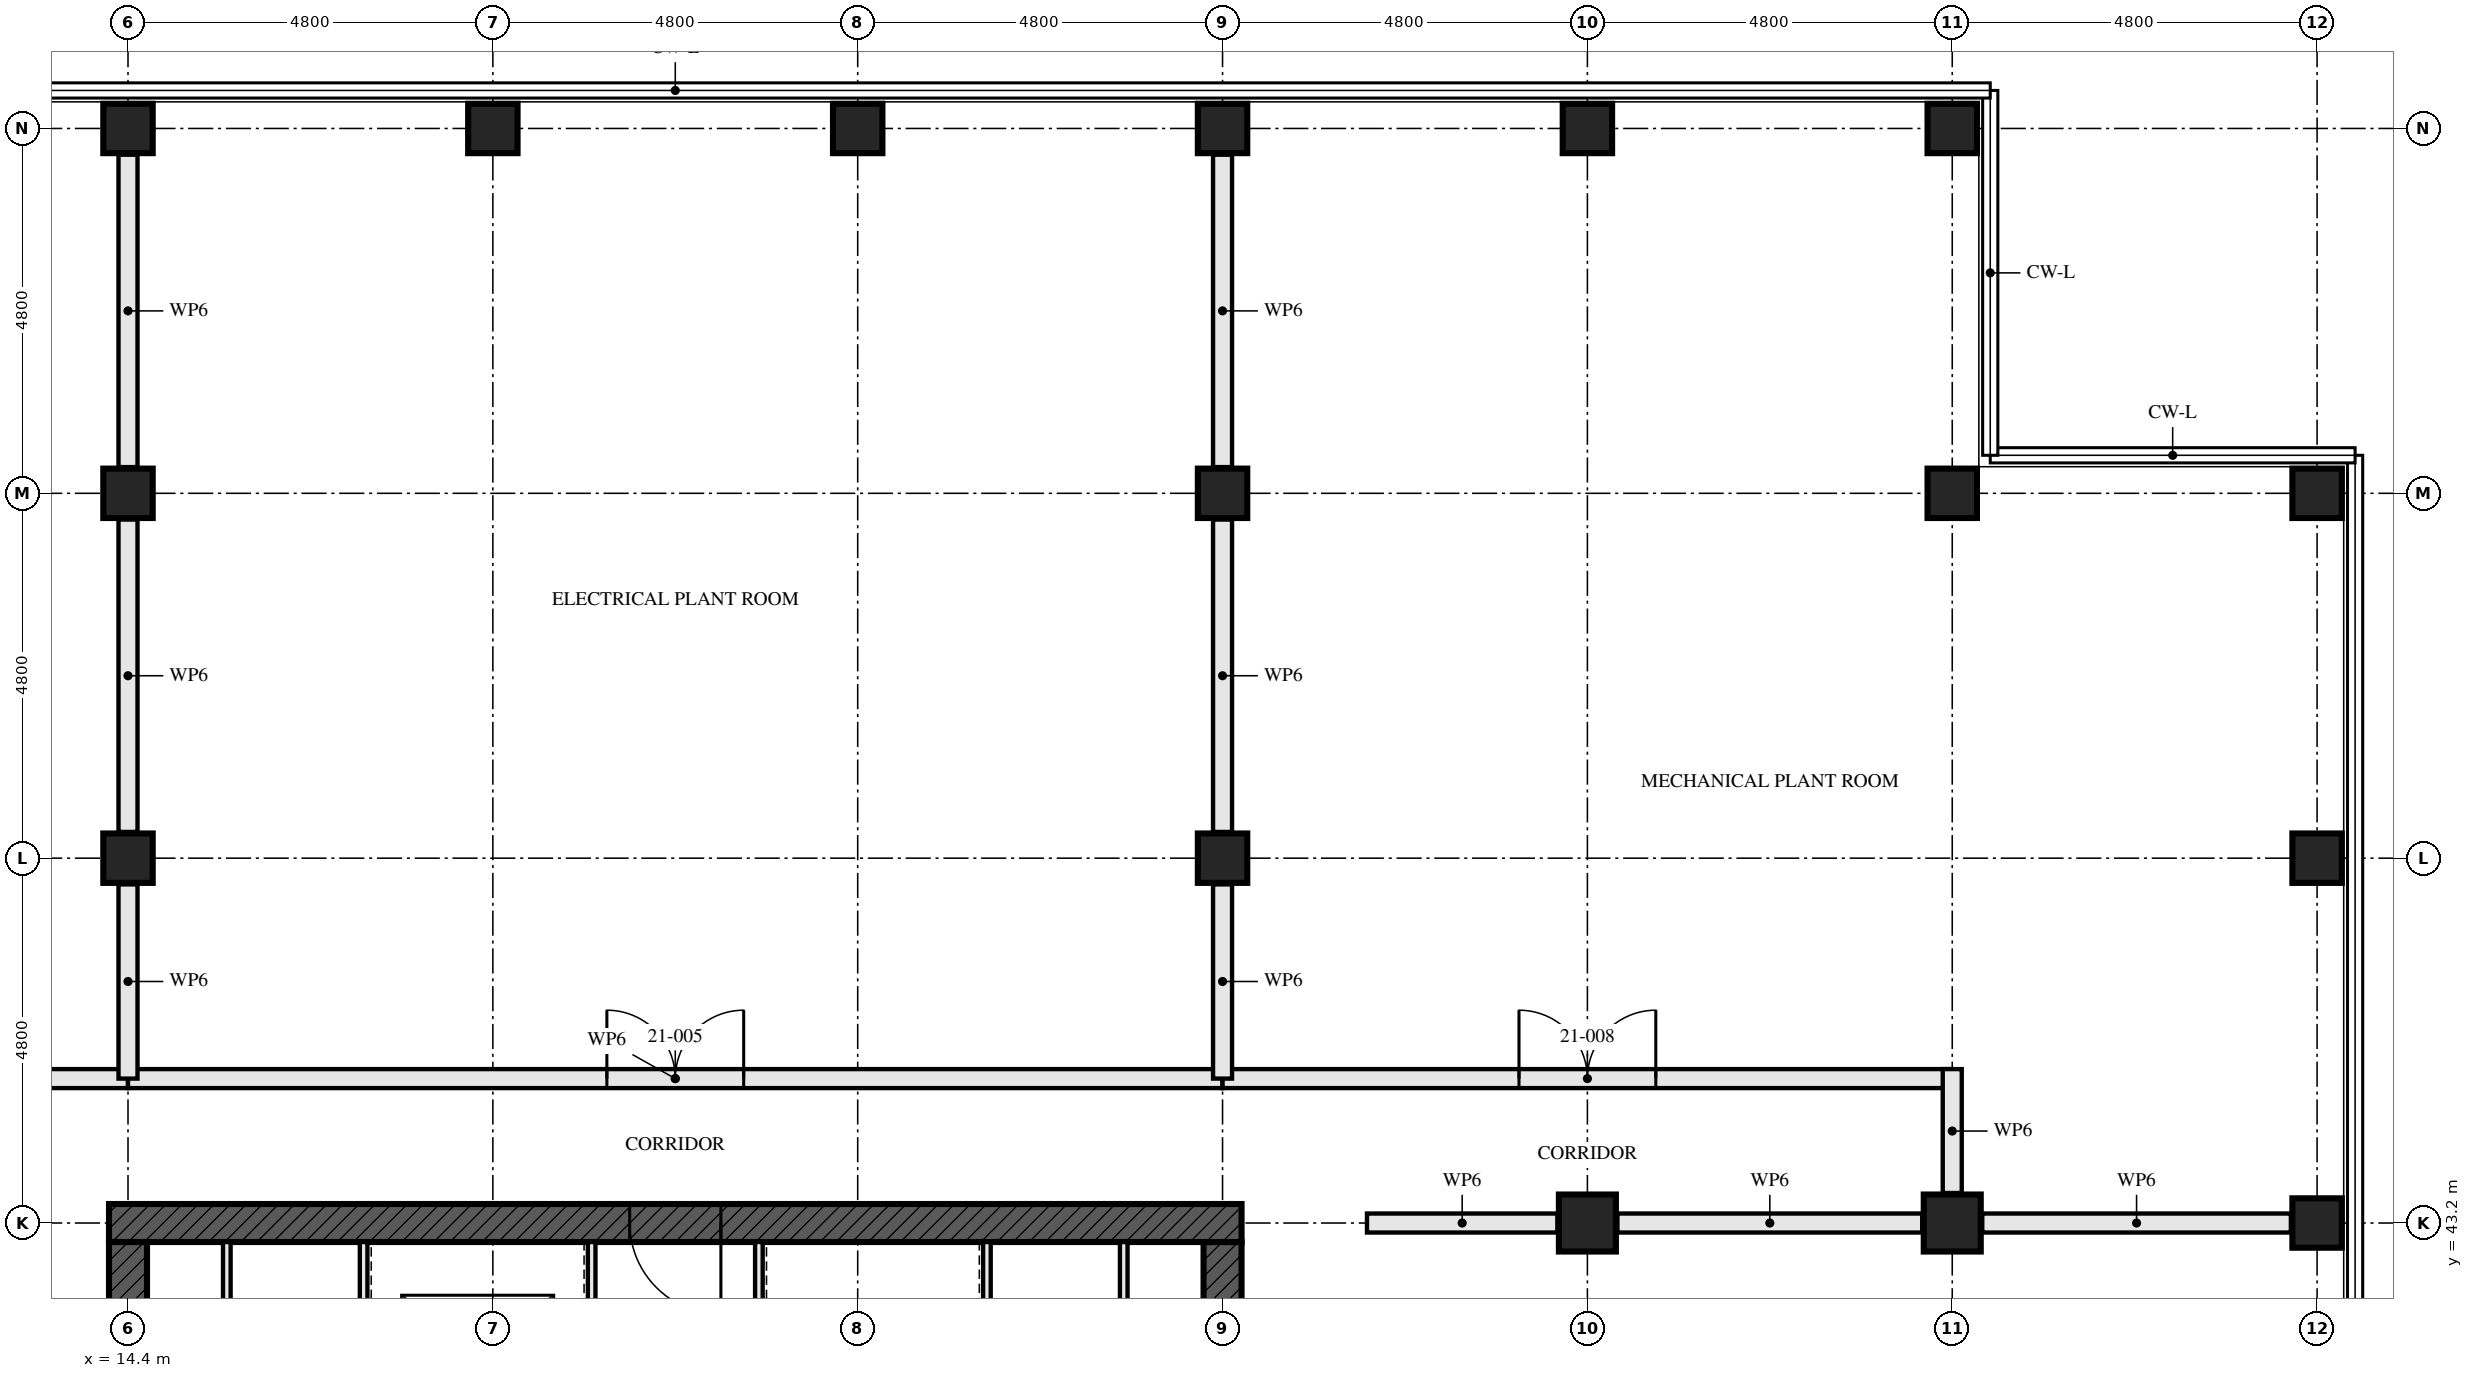
"""IFC4 building model, lengths in metres.
Left out: names, types, materials, properties, quantities, classifications, styles, units other than length and angle.
Written with IfcOpenShell. Run it as: python <this file> out.ifc"""

import sys

from ifc_helpers import new_model, si_unit, direction, frame, frame_2d, origin, origin_2d, place, context, subcontext, project, spatial, rectangle, hollow_rectangle, extrude, element, fill, save


model = new_model("IFC4")
c1 = context("Model", 3, precision=1e-05, world=origin(), true_north=direction((0.0, 1.0)))
c2 = subcontext(c1, "Body", "Model", "MODEL_VIEW")
j1 = project(units=[si_unit("LENGTHUNIT", "METRE"), si_unit("PLANEANGLEUNIT", "RADIAN")], contexts=[c1])
p1 = place(None, origin())
s1 = spatial("IfcSite", under=j1, at=p1, CompositionType="ELEMENT")
p2 = place(p1, origin())
s2 = spatial("IfcBuilding", under=s1, at=p2, CompositionType="ELEMENT")
p3 = place(p2, frame((0.0, 0.0, 79.5)))
s3 = spatial("IfcBuildingStorey", under=s2, at=p3, CompositionType="ELEMENT", Elevation=79.5)
for number, where, z_axis, x_axis in (
    (1, (14.4, 48.0, 0.0), (0.0, 0.0, 1.0), (1.0, 0.0, 0.0)),
    (2, (14.4, 52.8, 0.0), (0.0, 0.0, 1.0), (1.0, 0.0, 0.0)),
):
    element("IfcColumn", number, at=place(p3, frame(where, z_axis=z_axis, x_axis=x_axis)), inside=s3, PredefinedType="COLUMN", context=c2, shape_type="SweptSolid", body=[
        extrude(hollow_rectangle(XDim=0.65, YDim=0.65, WallThickness=0.05, at=origin_2d()), origin(), (0.0, 0.0, 1.0), 4.5),
    ])
for number, where, z_axis, x_axis in (
    (3, (14.4, 57.6, 0.0), (0.0, 0.0, 1.0), (0.0, 1.0, 0.0)),
    (4, (19.2, 57.6, 0.0), (0.0, 0.0, 1.0), (0.0, 1.0, 0.0)),
    (5, (24.0, 57.6, 0.0), (0.0, 0.0, 1.0), (0.0, 1.0, 0.0)),
):
    element("IfcColumn", number, at=place(p3, frame(where, z_axis=z_axis, x_axis=x_axis)), inside=s3, PredefinedType="COLUMN", context=c2, shape_type="SweptSolid", body=[
        extrude(hollow_rectangle(XDim=0.65, YDim=0.65, WallThickness=0.08, at=origin_2d()), origin(), (0.0, 0.0, 1.0), 4.5),
    ])
for number, where, z_axis, x_axis in (
    (6, (28.8, 48.0, 0.0), (0.0, 0.0, 1.0), (1.0, 0.0, 0.0)),
    (7, (28.8, 52.8, 0.0), (0.0, 0.0, 1.0), (1.0, 0.0, 0.0)),
):
    element("IfcColumn", number, at=place(p3, frame(where, z_axis=z_axis, x_axis=x_axis)), inside=s3, PredefinedType="COLUMN", context=c2, shape_type="SweptSolid", body=[
        extrude(hollow_rectangle(XDim=0.65, YDim=0.65, WallThickness=0.05, at=origin_2d()), origin(), (0.0, 0.0, 1.0), 4.5),
    ])
p4 = place(p3, frame((28.8, 57.6, 0.0), z_axis=(0.0, 0.0, 1.0), x_axis=(0.0, 1.0, 0.0)))
e8 = element("IfcColumn", 8, at=p4, inside=s3, PredefinedType="COLUMN", context=c2, shape_type="SweptSolid", body=[
    extrude(hollow_rectangle(XDim=0.65, YDim=0.65, WallThickness=0.08, at=origin_2d()), origin(), (0.0, 0.0, 1.0), 4.33),
])
p5 = place(p3, frame((33.6, 43.2, 0.0), z_axis=(0.0, 0.0, 1.0), x_axis=(0.0, 1.0, 0.0)))
e9 = element("IfcColumn", 9, at=p5, inside=s3, PredefinedType="COLUMN", context=c2, shape_type="SweptSolid", body=[
    extrude(hollow_rectangle(XDim=0.75, YDim=0.75, WallThickness=0.08, at=origin_2d()), origin(), (0.0, 0.0, 1.0), 4.5),
])
p6 = place(p3, frame((33.6, 57.6, 0.0), z_axis=(0.0, 0.0, 1.0), x_axis=(0.0, 1.0, 0.0)))
e10 = element("IfcColumn", 10, at=p6, inside=s3, PredefinedType="COLUMN", context=c2, shape_type="SweptSolid", body=[
    extrude(hollow_rectangle(XDim=0.65, YDim=0.65, WallThickness=0.08, at=origin_2d()), origin(), (0.0, 0.0, 1.0), 4.33),
])
p7 = place(p3, frame((38.4, 43.2, 0.0), z_axis=(0.0, 0.0, 1.0), x_axis=(0.0, 1.0, 0.0)))
e11 = element("IfcColumn", 11, at=p7, inside=s3, PredefinedType="COLUMN", context=c2, shape_type="SweptSolid", body=[
    extrude(hollow_rectangle(XDim=0.75, YDim=0.75, WallThickness=0.08, at=origin_2d()), origin(), (0.0, 0.0, 1.0), 4.5),
])
for number, where, z_axis, x_axis in (
    (12, (38.4, 52.8, 0.0), (0.0, 0.0, 1.0), (0.0, 1.0, 0.0)),
    (13, (38.4, 57.6, 0.0), (0.0, 0.0, 1.0), (0.0, 1.0, 0.0)),
    (14, (43.2, 43.2, 0.0), (0.0, 0.0, 1.0), (0.0, 1.0, 0.0)),
    (15, (43.2, 48.0, 0.0), (0.0, 0.0, 1.0), (1.0, 0.0, 0.0)),
    (16, (43.2, 52.8, 0.0), (0.0, 0.0, 1.0), (0.0, 1.0, 0.0)),
):
    element("IfcColumn", number, at=place(p3, frame(where, z_axis=z_axis, x_axis=x_axis)), inside=s3, PredefinedType="COLUMN", context=c2, shape_type="SweptSolid", body=[
        extrude(hollow_rectangle(XDim=0.65, YDim=0.65, WallThickness=0.08, at=origin_2d()), origin(), (0.0, 0.0, 1.0), 4.33),
    ])
p8 = place(p3, frame((29.05, 43.2, -0.25), z_axis=(0.0, 0.0, 1.0), x_axis=(-1.0, 0.0, 0.0)))
e17 = element("IfcWall", 17, at=p8, inside=s3, PredefinedType="SHEAR", context=c2, shape_type="SweptSolid", body=[
    extrude(rectangle(XDim=14.9, YDim=0.5, at=frame_2d((7.45, 0.0))), origin(), (0.0, 0.0, 1.0), 4.58),
])
p9 = place(p8, frame((6.85, 0.0, 0.25)))
e18 = element("IfcOpeningElement", 18, at=p9, cuts=e17, PredefinedType="OPENING", context=c2, shape_type="SweptSolid", body=[
    extrude(rectangle(XDim=1.2, YDim=2.1, at=frame_2d((0.6, 1.05))), frame((0.0, 0.26, 0.0), z_axis=(0.0, -1.0, 0.0), x_axis=(1.0, 0.0, 0.0)), (0.0, 0.0, 1.0), 0.521),
])
p10 = place(p3, frame((14.4, 42.95, -0.25), z_axis=(0.0, 0.0, 1.0), x_axis=(0.0, -1.0, 0.0)))
e19 = element("IfcWall", 19, at=p10, inside=s3, PredefinedType="SHEAR", context=c2, shape_type="SweptSolid", body=[
    extrude(rectangle(XDim=13.9, YDim=0.5, at=frame_2d((6.95, 0.0))), origin(), (0.0, 0.0, 1.0), 4.58),
])
p11 = place(p10, frame((6.35, 0.0, 0.25)))
e20 = element("IfcOpeningElement", 20, at=p11, cuts=e19, PredefinedType="OPENING", context=c2, shape_type="SweptSolid", body=[
    extrude(rectangle(XDim=1.2, YDim=2.1, at=frame_2d((0.6, 1.05))), frame((0.0, 0.26, 0.0), z_axis=(0.0, -1.0, 0.0), x_axis=(1.0, 0.0, 0.0)), (0.0, 0.0, 1.0), 0.521),
])
p12 = place(p3, frame((28.8, 29.05, -0.25), z_axis=(0.0, 0.0, 1.0), x_axis=(0.0, 1.0, 0.0)))
e21 = element("IfcWall", 21, at=p12, inside=s3, PredefinedType="SHEAR", context=c2, shape_type="SweptSolid", body=[
    extrude(rectangle(XDim=13.9, YDim=0.5, at=frame_2d((6.95, 0.0))), origin(), (0.0, 0.0, 1.0), 4.58),
])
p13 = place(p12, frame((6.35, 0.0, 0.25)))
e22 = element("IfcOpeningElement", 22, at=p13, cuts=e21, PredefinedType="OPENING", context=c2, shape_type="SweptSolid", body=[
    extrude(rectangle(XDim=1.2, YDim=2.1, at=frame_2d((0.6, 1.05))), frame((0.0, 0.26, 0.0), z_axis=(0.0, -1.0, 0.0), x_axis=(1.0, 0.0, 0.0)), (0.0, 0.0, 1.0), 0.521),
])
p14 = place(p3, frame((14.4, 45.1, 0.0), z_axis=(0.0, 0.0, 1.0), x_axis=(-1.0, 0.0, 0.0)))
e23 = element("IfcWall", 23, at=p14, inside=s3, PredefinedType="SOLIDWALL", context=c2, shape_type="SweptSolid", body=[
    extrude(rectangle(XDim=9.6, YDim=0.25, at=frame_2d((4.8, 0.0))), origin(), (0.0, 0.0, 1.0), 4.33),
])
p15 = place(p14, frame((3.9, 0.0, 0.0)))
e24 = element("IfcOpeningElement", 24, at=p15, cuts=e23, PredefinedType="OPENING", context=c2, shape_type="SweptSolid", body=[
    extrude(rectangle(XDim=1.8, YDim=2.4, at=frame_2d((0.9, 1.2))), frame((0.0, 0.135, 0.0), z_axis=(0.0, -1.0, 0.0), x_axis=(1.0, 0.0, 0.0)), (0.0, 0.0, 1.0), 0.271),
])
p16 = place(p3, frame((28.8, 45.1, 0.0), z_axis=(0.0, 0.0, 1.0), x_axis=(-1.0, 0.0, 0.0)))
e25 = element("IfcWall", 25, at=p16, inside=s3, PredefinedType="SOLIDWALL", context=c2, shape_type="SweptSolid", body=[
    extrude(rectangle(XDim=14.4, YDim=0.25, at=frame_2d((7.2, 0.0))), origin(), (0.0, 0.0, 1.0), 4.33),
])
p17 = place(p16, frame((6.3, 0.0, 0.0)))
e26 = element("IfcOpeningElement", 26, at=p17, cuts=e25, PredefinedType="OPENING", context=c2, shape_type="SweptSolid", body=[
    extrude(rectangle(XDim=1.8, YDim=2.4, at=frame_2d((0.9, 1.2))), frame((0.0, 0.135, 0.0), z_axis=(0.0, -1.0, 0.0), x_axis=(1.0, 0.0, 0.0)), (0.0, 0.0, 1.0), 0.271),
])
p18 = place(p3, frame((38.4, 45.1, 0.0), z_axis=(0.0, 0.0, 1.0), x_axis=(-1.0, 0.0, 0.0)))
e27 = element("IfcWall", 27, at=p18, inside=s3, PredefinedType="SOLIDWALL", context=c2, shape_type="SweptSolid", body=[
    extrude(rectangle(XDim=9.6, YDim=0.25, at=frame_2d((4.8, 0.0))), origin(), (0.0, 0.0, 1.0), 4.33),
])
p19 = place(p18, frame((3.9, 0.0, 0.0)))
e28 = element("IfcOpeningElement", 28, at=p19, cuts=e27, PredefinedType="OPENING", context=c2, shape_type="SweptSolid", body=[
    extrude(rectangle(XDim=1.8, YDim=2.4, at=frame_2d((0.9, 1.2))), frame((0.0, 0.135, 0.0), z_axis=(0.0, -1.0, 0.0), x_axis=(1.0, 0.0, 0.0)), (0.0, 0.0, 1.0), 0.271),
])
p20 = place(p3, frame((38.4, 45.225, 0.0), z_axis=(0.0, 0.0, 1.0), x_axis=(0.0, -1.0, 0.0)))
e29 = element("IfcWall", 29, at=p20, inside=s3, PredefinedType="SOLIDWALL", context=c2, shape_type="SweptSolid", body=[
    extrude(rectangle(XDim=1.63, YDim=0.25, at=frame_2d((0.815, 0.0))), origin(), (0.0, 0.0, 1.0), 4.33),
])
for number, where, z_axis, x_axis in (
    (30, (15.7, 37.15, 0.0), (0.0, 0.0, 1.0), (0.0, 1.0, 0.0)),
    (31, (27.5, 37.15, 0.0), (0.0, 0.0, 1.0), (0.0, 1.0, 0.0)),
):
    element("IfcWall", number, at=place(p3, frame(where, z_axis=z_axis, x_axis=x_axis)), inside=s3, PredefinedType="SOLIDWALL", context=c2, shape_type="SweptSolid", body=[
        extrude(rectangle(XDim=5.8, YDim=0.1, at=frame_2d((2.9, 0.0))), origin(), (0.0, 0.0, 1.0), 4.33),
    ])
p21 = place(p3, frame((20.5, 37.15, 0.0), z_axis=(0.0, 0.0, 1.0), x_axis=(0.0, 1.0, 0.0)))
e32 = element("IfcWall", 32, at=p21, inside=s3, PredefinedType="SOLIDWALL", context=c2, shape_type="SweptSolid", body=[
    extrude(rectangle(XDim=5.8, YDim=0.1, at=frame_2d((2.9, 0.0))), origin(), (0.0, 0.0, 1.0), 4.33),
])
p22 = place(p21, frame((0.925, 0.0, 0.0)))
e33 = element("IfcOpeningElement", 33, at=p22, cuts=e32, PredefinedType="OPENING", context=c2, shape_type="SweptSolid", body=[
    extrude(rectangle(XDim=1.0, YDim=2.1, at=frame_2d((0.5, 1.05))), frame((0.0, 0.061, 0.0), z_axis=(0.0, -1.0, 0.0), x_axis=(1.0, 0.0, 0.0)), (0.0, 0.0, 1.0), 0.121),
])
p23 = place(p21, frame((3.9, 0.0, 0.0)))
e34 = element("IfcOpeningElement", 34, at=p23, cuts=e32, PredefinedType="OPENING", context=c2, shape_type="SweptSolid", body=[
    extrude(rectangle(XDim=1.0, YDim=2.1, at=frame_2d((0.5, 1.05))), frame((0.0, 0.061, 0.0), z_axis=(0.0, -1.0, 0.0), x_axis=(1.0, 0.0, 0.0)), (0.0, 0.0, 1.0), 0.121),
])
for number, where, z_axis, x_axis in (
    (35, (22.7, 37.15, 0.0), (0.0, 0.0, 1.0), (0.0, 1.0, 0.0)),
    (36, (17.5, 37.15, 0.0), (0.0, 0.0, 1.0), (0.0, 1.0, 0.0)),
    (37, (25.7, 37.15, 0.0), (0.0, 0.0, 1.0), (0.0, 1.0, 0.0)),
):
    element("IfcWall", number, at=place(p3, frame(where, z_axis=z_axis, x_axis=x_axis)), inside=s3, PredefinedType="SOLIDWALL", context=c2, shape_type="SweptSolid", body=[
        extrude(rectangle(XDim=5.8, YDim=0.1, at=frame_2d((2.9, 0.0))), origin(), (0.0, 0.0, 1.0), 4.33),
    ])
p24 = place(p3, frame((14.4, 45.1, 0.0), z_axis=(0.0, 0.0, 1.0), x_axis=(0.0, 1.0, 0.0)))
e38 = element("IfcWall", 38, at=p24, inside=s3, PredefinedType="SOLIDWALL", context=c2, shape_type="SweptSolid", body=[
    extrude(rectangle(XDim=2.555, YDim=0.25, at=frame_2d((1.277, 0.0))), origin(), (0.0, 0.0, 1.0), 2.82),
])
p25 = place(p3, frame((14.4, 48.345, 0.0), z_axis=(0.0, 0.0, 1.0), x_axis=(0.0, 1.0, 0.0)))
e39 = element("IfcWall", 39, at=p25, inside=s3, PredefinedType="SOLIDWALL", context=c2, shape_type="SweptSolid", body=[
    extrude(rectangle(XDim=4.11, YDim=0.25, at=frame_2d((2.055, 0.0))), origin(), (0.0, 0.0, 1.0), 2.82),
])
p26 = place(p3, frame((14.4, 53.145, 0.0), z_axis=(0.0, 0.0, 1.0), x_axis=(0.0, 1.0, 0.0)))
e40 = element("IfcWall", 40, at=p26, inside=s3, PredefinedType="SOLIDWALL", context=c2, shape_type="SweptSolid", body=[
    extrude(rectangle(XDim=4.11, YDim=0.25, at=frame_2d((2.055, 0.0))), origin(), (0.0, 0.0, 1.0), 2.82),
])
p27 = place(p3, frame((28.8, 45.1, 0.0), z_axis=(0.0, 0.0, 1.0), x_axis=(0.0, 1.0, 0.0)))
e41 = element("IfcWall", 41, at=p27, inside=s3, PredefinedType="SOLIDWALL", context=c2, shape_type="SweptSolid", body=[
    extrude(rectangle(XDim=2.555, YDim=0.25, at=frame_2d((1.277, 0.0))), origin(), (0.0, 0.0, 1.0), 2.82),
])
p28 = place(p3, frame((28.8, 48.345, 0.0), z_axis=(0.0, 0.0, 1.0), x_axis=(0.0, 1.0, 0.0)))
e42 = element("IfcWall", 42, at=p28, inside=s3, PredefinedType="SOLIDWALL", context=c2, shape_type="SweptSolid", body=[
    extrude(rectangle(XDim=4.11, YDim=0.25, at=frame_2d((2.055, 0.0))), origin(), (0.0, 0.0, 1.0), 2.82),
])
p29 = place(p3, frame((28.8, 53.145, 0.0), z_axis=(0.0, 0.0, 1.0), x_axis=(0.0, 1.0, 0.0)))
e43 = element("IfcWall", 43, at=p29, inside=s3, PredefinedType="SOLIDWALL", context=c2, shape_type="SweptSolid", body=[
    extrude(rectangle(XDim=4.11, YDim=0.25, at=frame_2d((2.055, 0.0))), origin(), (0.0, 0.0, 1.0), 2.82),
])
p30 = place(p3, frame((42.855, 43.2, 0.0), z_axis=(0.0, 0.0, 1.0), x_axis=(-1.0, 0.0, 0.0)))
e44 = element("IfcWall", 44, at=p30, inside=s3, PredefinedType="SOLIDWALL", context=c2, shape_type="SweptSolid", body=[
    extrude(rectangle(XDim=4.06, YDim=0.25, at=frame_2d((2.03, 0.0))), origin(), (0.0, 0.0, 1.0), 3.12),
])
p31 = place(p3, frame((38.005, 43.2, 0.0), z_axis=(0.0, 0.0, 1.0), x_axis=(-1.0, 0.0, 0.0)))
e45 = element("IfcWall", 45, at=p31, inside=s3, PredefinedType="SOLIDWALL", context=c2, shape_type="SweptSolid", body=[
    extrude(rectangle(XDim=4.01, YDim=0.25, at=frame_2d((2.005, 0.0))), origin(), (0.0, 0.0, 1.0), 3.12),
])
p32 = place(p3, frame((33.205, 43.2, 0.0), z_axis=(0.0, 0.0, 1.0), x_axis=(-1.0, 0.0, 0.0)))
e46 = element("IfcWall", 46, at=p32, inside=s3, PredefinedType="SOLIDWALL", context=c2, shape_type="SweptSolid", body=[
    extrude(rectangle(XDim=2.505, YDim=0.25, at=frame_2d((1.252, 0.0))), origin(), (0.0, 0.0, 1.0), 3.12),
])
p33 = place(p17, frame((1.8, 0.0, 0.0), z_axis=(0.0, 0.0, 1.0), x_axis=(-1.0, 0.0, 0.0)))
e47 = element("IfcDoor", 47, at=p33, inside=s3, OperationType="DOUBLE_DOOR_SINGLE_SWING", PredefinedType="DOOR", context=c2, shape_type="SweptSolid", body=[
    extrude(rectangle(XDim=1.8, YDim=2.4, at=frame_2d((0.9, 1.2))), frame((0.0, 0.032, 0.0), z_axis=(0.0, -1.0, 0.0), x_axis=(1.0, 0.0, 0.0)), (0.0, 0.0, 1.0), 0.064),
])
fill(e26, e47)
p34 = place(p19, frame((1.8, 0.0, 0.0), z_axis=(0.0, 0.0, 1.0), x_axis=(-1.0, 0.0, 0.0)))
e48 = element("IfcDoor", 48, at=p34, inside=s3, OperationType="DOUBLE_DOOR_SINGLE_SWING", PredefinedType="DOOR", context=c2, shape_type="SweptSolid", body=[
    extrude(rectangle(XDim=1.8, YDim=2.4, at=frame_2d((0.9, 1.2))), frame((0.0, 0.032, 0.0), z_axis=(0.0, -1.0, 0.0), x_axis=(1.0, 0.0, 0.0)), (0.0, 0.0, 1.0), 0.064),
])
fill(e28, e48)
p35 = place(p9, origin())
e49 = element("IfcDoor", 49, at=p35, inside=s3, OperationType="SINGLE_SWING_LEFT", PredefinedType="DOOR", context=c2, shape_type="SweptSolid", body=[
    extrude(rectangle(XDim=1.2, YDim=2.1, at=frame_2d((0.6, 1.05))), frame((0.0, 0.027, 0.0), z_axis=(0.0, -1.0, 0.0), x_axis=(1.0, 0.0, 0.0)), (0.0, 0.0, 1.0), 0.054),
])
fill(e18, e49)
save(model, sys.argv[1])
